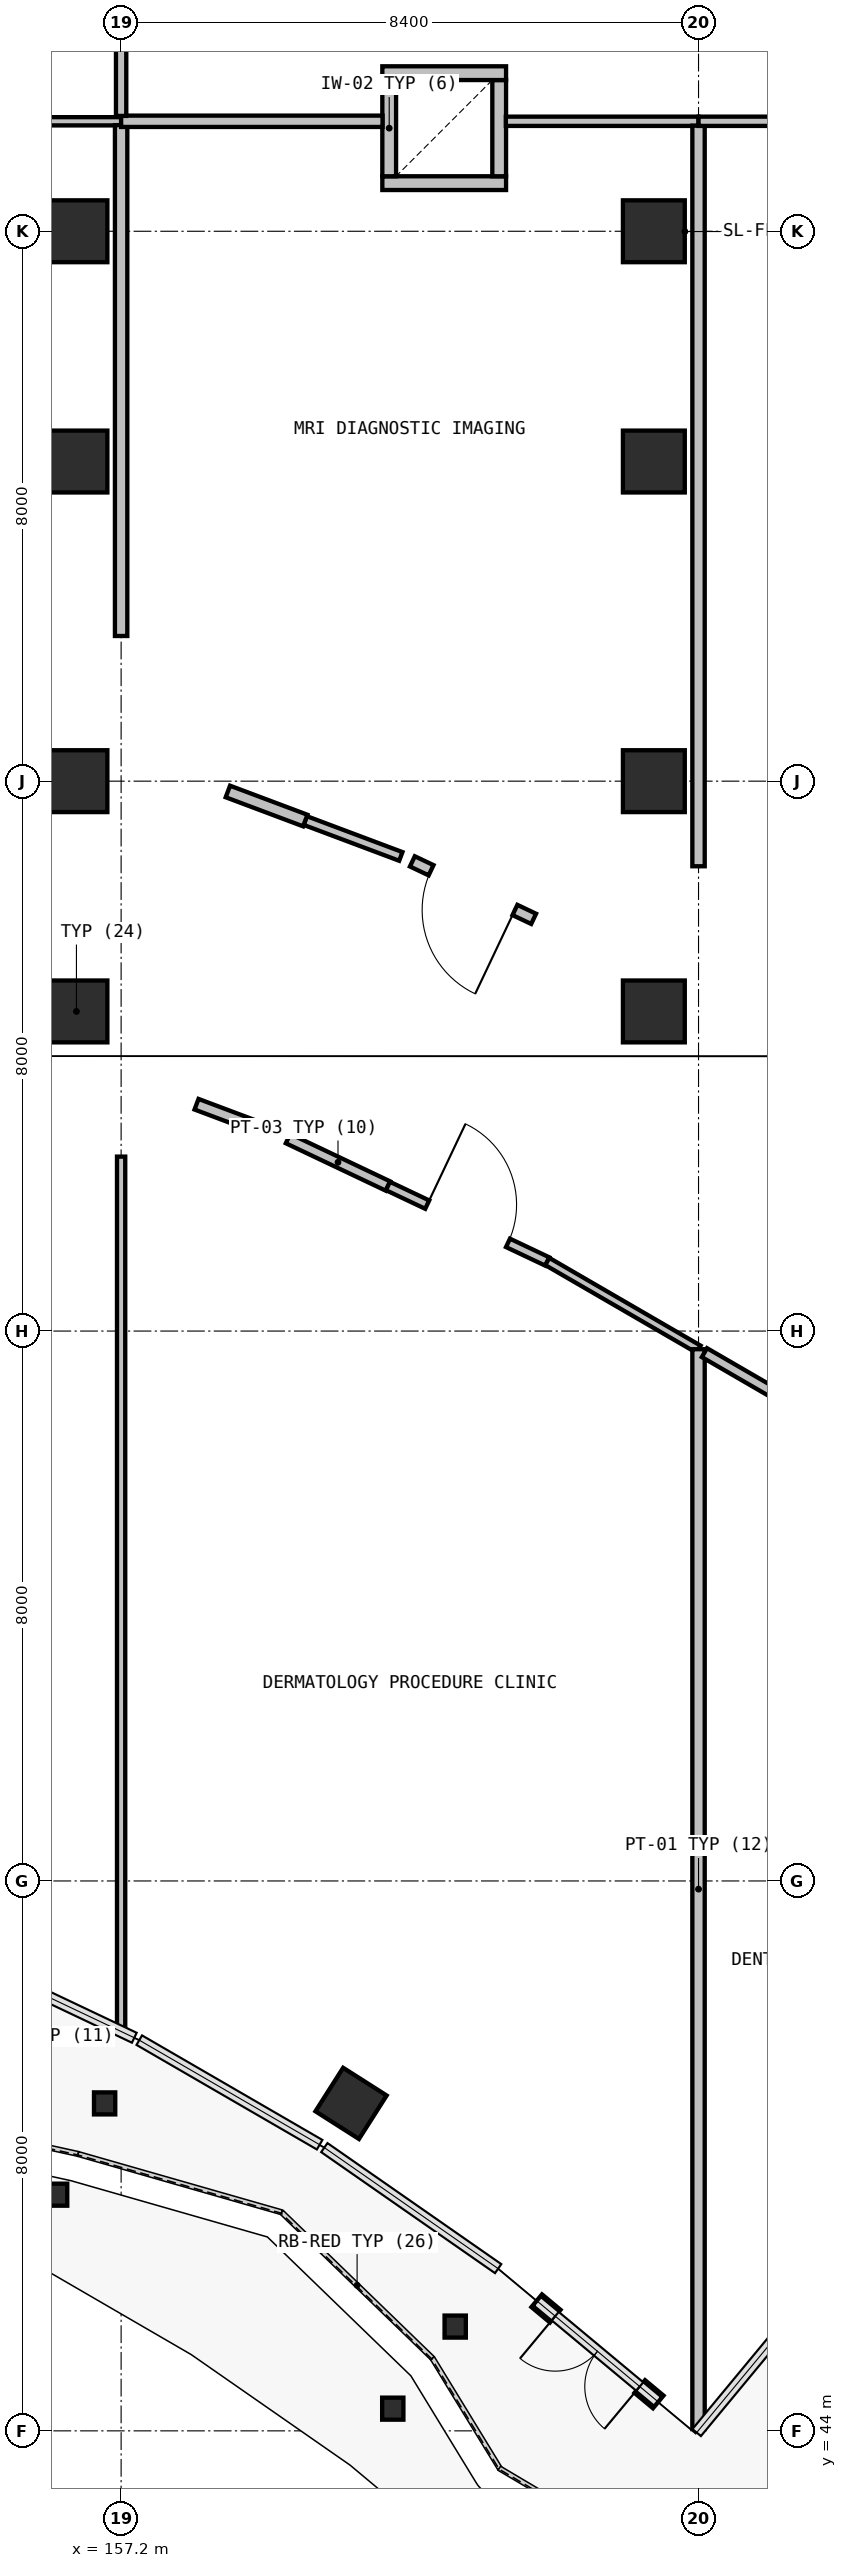
"""IFC4 building model, lengths in metres.
Left out: names, types, materials, properties, quantities, classifications, styles, units other than length and angle.
Written with IfcOpenShell. Run it as: python <this file> out.ifc"""

import sys

from ifc_helpers import new_model, si_unit, direction, frame, frame_2d, origin, origin_2d, place, context, subcontext, project, spatial, rectangle, i_section, extrude, element, fill, save


model = new_model("IFC4")
c1 = context("Model", 3, precision=1e-05, world=origin(), true_north=direction((0.0, 1.0)))
c2 = subcontext(c1, "Body", "Model", "MODEL_VIEW")
j1 = project(units=[si_unit("LENGTHUNIT", "METRE"), si_unit("PLANEANGLEUNIT", "RADIAN")], contexts=[c1])
p1 = place(None, origin())
s1 = spatial("IfcSite", under=j1, at=p1, CompositionType="ELEMENT")
p2 = place(p1, origin())
s2 = spatial("IfcBuilding", under=s1, at=p2, CompositionType="ELEMENT")
p3 = place(p2, origin())
s3 = spatial("IfcBuildingStorey", under=s2, at=p3, CompositionType="ELEMENT", Elevation=0.0)
for number, where, z_axis, x_axis in (
    (1, (156.96, 48.764, 0.0), (0.0, 0.0, 1.0), (1.0, 0.0, 0.0)),
    (2, (156.262, 47.436, 0.0), (0.0, 0.0, 1.0), (1.0, 0.0, 0.0)),
    (3, (162.06, 45.517, 0.0), (0.0, 0.0, 1.0), (1.0, 0.0, 0.0)),
    (4, (161.152, 44.323, 0.0), (0.0, 0.0, 1.0), (1.0, 0.0, 0.0)),
):
    element("IfcColumn", number, at=place(p3, frame(where, z_axis=z_axis, x_axis=x_axis)), inside=s3, PredefinedType="COLUMN", context=c2, shape_type="SweptSolid", body=[
        extrude(i_section(OverallWidth=0.309, OverallDepth=0.321, WebThickness=0.014, FlangeThickness=0.022, at=origin_2d()), origin(), (0.0, 0.0, 1.0), 5.08),
    ])
for number, where, z_axis, x_axis in (
    (5, (156.55, 64.65, 0.0), (0.0, 0.0, 1.0), (1.0, 0.0, 0.0)),
    (6, (156.55, 68.0, 0.0), (0.0, 0.0, 1.0), (1.0, 0.0, 0.0)),
    (7, (156.55, 72.65, 0.0), (0.0, 0.0, 1.0), (1.0, 0.0, 0.0)),
    (8, (156.55, 76.0, 0.0), (0.0, 0.0, 1.0), (1.0, 0.0, 0.0)),
    (9, (164.95, 64.65, 0.0), (0.0, 0.0, 1.0), (1.0, 0.0, 0.0)),
    (10, (164.95, 68.0, 0.0), (0.0, 0.0, 1.0), (1.0, 0.0, 0.0)),
    (11, (164.95, 72.65, 0.0), (0.0, 0.0, 1.0), (1.0, 0.0, 0.0)),
    (12, (164.95, 76.0, 0.0), (0.0, 0.0, 1.0), (1.0, 0.0, 0.0)),
):
    element("IfcColumn", number, at=place(p3, frame(where, z_axis=z_axis, x_axis=x_axis)), inside=s3, PredefinedType="COLUMN", context=c2, shape_type="SweptSolid", body=[
        extrude(rectangle(XDim=0.9, YDim=0.9, at=origin_2d()), origin(), (0.0, 0.0, 1.0), 5.4),
    ])
p4 = place(p3, frame((160.545, 48.764, 0.0), z_axis=(0.0, 0.0, 1.0), x_axis=(0.537064068078, 0.843541455282, 0.0)))
e13 = element("IfcColumn", 13, at=p4, inside=s3, PredefinedType="COLUMN", context=c2, shape_type="SweptSolid", body=[
    extrude(rectangle(XDim=0.75, YDim=0.75, at=origin_2d()), origin(), (0.0, 0.0, 1.0), 5.4),
])
p5 = place(p3, frame((165.014, 44.421, 0.0), z_axis=(0.0, 0.0, 1.0), x_axis=(-0.768438701021, 0.639923403833, 0.0)))
e14 = element("IfcWall", 14, at=p5, inside=s3, PredefinedType="SOLIDWALL", context=c2, shape_type="SweptSolid", body=[
    extrude(rectangle(XDim=2.301, YDim=0.24, at=frame_2d((1.15, 0.0))), origin(), (0.0, 0.0, 1.0), 2.32),
])
p6 = place(p5, frame((0.35, 0.0, 0.0)))
e15 = element("IfcOpeningElement", 15, at=p6, cuts=e14, PredefinedType="OPENING", context=c2, shape_type="SweptSolid", body=[
    extrude(rectangle(XDim=1.6, YDim=2.2, at=frame_2d((0.8, 1.1))), frame((0.0, 0.13, 0.0), z_axis=(0.0, -1.0, 0.0), x_axis=(1.0, 0.0, 0.0)), (0.0, 0.0, 1.0), 0.26),
])
p7 = place(p3, frame((161.0, 76.7, 0.0), z_axis=(0.0, 0.0, 1.0), x_axis=(1.0, 0.0, 0.0)))
e16 = element("IfcWall", 16, at=p7, inside=s3, PredefinedType="SOLIDWALL", context=c2, shape_type="SweptSolid", body=[
    extrude(rectangle(XDim=1.8, YDim=0.2, at=frame_2d((0.9, 0.0))), origin(), (0.0, 0.0, 1.0), 5.08),
])
p8 = place(p3, frame((162.7, 76.8, 0.0), z_axis=(0.0, 0.0, 1.0), x_axis=(0.0, 1.0, 0.0)))
e17 = element("IfcWall", 17, at=p8, inside=s3, PredefinedType="SOLIDWALL", context=c2, shape_type="SweptSolid", body=[
    extrude(rectangle(XDim=1.4, YDim=0.2, at=frame_2d((0.7, 0.0))), origin(), (0.0, 0.0, 1.0), 5.08),
])
p9 = place(p3, frame((162.8, 78.3, 0.0), z_axis=(0.0, 0.0, 1.0), x_axis=(-1.0, 0.0, 0.0)))
e18 = element("IfcWall", 18, at=p9, inside=s3, PredefinedType="SOLIDWALL", context=c2, shape_type="SweptSolid", body=[
    extrude(rectangle(XDim=1.8, YDim=0.2, at=frame_2d((0.9, 0.0))), origin(), (0.0, 0.0, 1.0), 5.08),
])
p10 = place(p3, frame((161.1, 78.2, 0.0), z_axis=(0.0, 0.0, 1.0), x_axis=(0.0, -1.0, 0.0)))
e19 = element("IfcWall", 19, at=p10, inside=s3, PredefinedType="SOLIDWALL", context=c2, shape_type="SweptSolid", body=[
    extrude(rectangle(XDim=1.4, YDim=0.2, at=frame_2d((0.7, 0.0))), origin(), (0.0, 0.0, 1.0), 5.08),
])
p11 = place(p3, frame((157.2, 62.538, 0.0), z_axis=(0.0, 0.0, 1.0), x_axis=(0.0, -1.0, 0.0)))
e20 = element("IfcWall", 20, at=p11, inside=s3, PredefinedType="PARTITIONING", context=c2, shape_type="SweptSolid", body=[
    extrude(rectangle(XDim=12.715, YDim=0.12, at=frame_2d((6.357, 0.0))), origin(), (0.0, 0.0, 1.0), 5.08),
])
p12 = place(p3, frame((140.4, 77.6, 0.0), z_axis=(0.0, 0.0, 1.0), x_axis=(1.0, 0.0, 0.0)))
e21 = element("IfcWall", 21, at=p12, inside=s3, PredefinedType="PARTITIONING", context=c2, shape_type="SweptSolid", body=[
    extrude(rectangle(XDim=16.8, YDim=0.12, at=frame_2d((8.4, 0.0))), origin(), (0.0, 0.0, 1.0), 5.08),
])
p13 = place(p3, frame((157.2, 77.544, 0.0), z_axis=(0.0, 0.0, 1.0), x_axis=(0.0, -1.0, 0.0)))
e22 = element("IfcWall", 22, at=p13, inside=s3, PredefinedType="PARTITIONING", context=c2, shape_type="SweptSolid", body=[
    extrude(rectangle(XDim=7.432, YDim=0.18, at=frame_2d((3.716, 0.0))), origin(), (0.0, 0.0, 1.0), 5.08),
])
p14 = place(p3, frame((158.297, 63.3, 0.0), z_axis=(0.0, 0.0, 1.0), x_axis=(0.936068241983, -0.351818484947, 0.0)))
e23 = element("IfcWall", 23, at=p14, inside=s3, PredefinedType="PARTITIONING", context=c2, shape_type="SweptSolid", body=[
    extrude(rectangle(XDim=1.078, YDim=0.165, at=frame_2d((0.539, 0.0))), origin(), (0.0, 0.0, 1.0), 5.08),
])
p15 = place(p3, frame((159.628, 62.8, 0.0), z_axis=(0.0, 0.0, 1.0), x_axis=(0.903459666256, -0.428673105581, 0.0)))
e24 = element("IfcWall", 24, at=p15, inside=s3, PredefinedType="PARTITIONING", context=c2, shape_type="SweptSolid", body=[
    extrude(rectangle(XDim=1.609, YDim=0.15, at=frame_2d((0.805, 0.0))), origin(), (0.0, 0.0, 1.0), 5.08),
])
p16 = place(p3, frame((161.082, 62.11, 0.0), z_axis=(0.0, 0.0, 1.0), x_axis=(0.903706825323, -0.428151811703, 0.0)))
e25 = element("IfcWall", 25, at=p16, inside=s3, PredefinedType="PARTITIONING", context=c2, shape_type="SweptSolid", body=[
    extrude(rectangle(XDim=2.565, YDim=0.135, at=frame_2d((1.282, 0.0))), origin(), (0.0, 0.0, 1.0), 5.08),
])
p17 = place(p16, frame((0.632, 0.0, 0.0)))
e26 = element("IfcOpeningElement", 26, at=p17, cuts=e25, PredefinedType="OPENING", context=c2, shape_type="SweptSolid", body=[
    extrude(rectangle(XDim=1.3, YDim=2.15, at=frame_2d((0.65, 1.075))), frame((0.0, 0.077, 0.0), z_axis=(0.0, -1.0, 0.0), x_axis=(1.0, 0.0, 0.0)), (0.0, 0.0, 1.0), 0.155),
])
p18 = place(p3, frame((163.4, 61.012, 0.0), z_axis=(0.0, 0.0, 1.0), x_axis=(0.865071180383, -0.501649133231, 0.0)))
e27 = element("IfcWall", 27, at=p18, inside=s3, PredefinedType="PARTITIONING", context=c2, shape_type="SweptSolid", body=[
    extrude(rectangle(XDim=2.543, YDim=0.12, at=frame_2d((1.272, 0.0))), origin(), (0.0, 0.0, 1.0), 5.08),
])
p19 = place(p3, frame((165.6, 59.736, 0.0), z_axis=(0.0, 0.0, 1.0), x_axis=(0.0, -1.0, 0.0)))
e28 = element("IfcWall", 28, at=p19, inside=s3, PredefinedType="PARTITIONING", context=c2, shape_type="SweptSolid", body=[
    extrude(rectangle(XDim=15.71, YDim=0.18, at=frame_2d((7.855, 0.0))), origin(), (0.0, 0.0, 1.0), 5.08),
])
p20 = place(p3, frame((163.201, 65.997, 0.0), z_axis=(0.0, 0.0, 1.0), x_axis=(-0.903658874167, 0.428253008325, 0.0)))
e29 = element("IfcWall", 29, at=p20, inside=s3, PredefinedType="PARTITIONING", context=c2, shape_type="SweptSolid", body=[
    extrude(rectangle(XDim=1.952, YDim=0.165, at=frame_2d((0.976, 0.0))), origin(), (0.0, 0.0, 1.0), 5.08),
])
p21 = place(p20, frame((0.301, 0.0, 0.0)))
e30 = element("IfcOpeningElement", 30, at=p21, cuts=e29, PredefinedType="OPENING", context=c2, shape_type="SweptSolid", body=[
    extrude(rectangle(XDim=1.35, YDim=2.15, at=frame_2d((0.675, 1.075))), frame((0.0, 0.093, 0.0), z_axis=(0.0, -1.0, 0.0), x_axis=(1.0, 0.0, 0.0)), (0.0, 0.0, 1.0), 0.185),
])
p22 = place(p3, frame((161.269, 66.905, 0.0), z_axis=(0.0, 0.0, 1.0), x_axis=(-0.936180444255, 0.351519808538, 0.0)))
e31 = element("IfcWall", 31, at=p22, inside=s3, PredefinedType="PARTITIONING", context=c2, shape_type="SweptSolid", body=[
    extrude(rectangle(XDim=1.485, YDim=0.135, at=frame_2d((0.742, 0.0))), origin(), (0.0, 0.0, 1.0), 5.08),
])
p23 = place(p3, frame((159.879, 67.427, 0.0), z_axis=(0.0, 0.0, 1.0), x_axis=(-0.936095416468, 0.351746174488, 0.0)))
e32 = element("IfcWall", 32, at=p23, inside=s3, PredefinedType="PARTITIONING", context=c2, shape_type="SweptSolid", body=[
    extrude(rectangle(XDim=1.203, YDim=0.18, at=frame_2d((0.602, 0.0))), origin(), (0.0, 0.0, 1.0), 4.23),
])
p24 = place(p3, frame((157.2, 77.6, 0.0), z_axis=(0.0, 0.0, 1.0), x_axis=(1.0, 0.0, 0.0)))
e33 = element("IfcWall", 33, at=p24, inside=s3, PredefinedType="PARTITIONING", context=c2, shape_type="SweptSolid", body=[
    extrude(rectangle(XDim=3.803, YDim=0.165, at=frame_2d((1.901, 0.0))), origin(), (0.0, 0.0, 1.0), 5.08),
])
p25 = place(p3, frame((162.797, 77.6, 0.0), z_axis=(0.0, 0.0, 1.0), x_axis=(1.0, 0.0, 0.0)))
e34 = element("IfcWall", 34, at=p25, inside=s3, PredefinedType="PARTITIONING", context=c2, shape_type="SweptSolid", body=[
    extrude(rectangle(XDim=2.803, YDim=0.135, at=frame_2d((1.401, 0.0))), origin(), (0.0, 0.0, 1.0), 5.08),
])
p26 = place(p3, frame((165.6, 77.536, 0.0), z_axis=(0.0, 0.0, 1.0), x_axis=(0.0, -1.0, 0.0)))
e35 = element("IfcWall", 35, at=p26, inside=s3, PredefinedType="PARTITIONING", context=c2, shape_type="SweptSolid", body=[
    extrude(rectangle(XDim=10.774, YDim=0.18, at=frame_2d((5.387, 0.0))), origin(), (0.0, 0.0, 1.0), 5.08),
])
p27 = place(p3, frame((165.686, 59.686, 0.0), z_axis=(0.0, 0.0, 1.0), x_axis=(0.864985497408, -0.501796860565, 0.0)))
e36 = element("IfcWall", 36, at=p27, inside=s3, PredefinedType="PARTITIONING", context=c2, shape_type="SweptSolid", body=[
    extrude(rectangle(XDim=1.531, YDim=0.15, at=frame_2d((0.765, 0.0))), origin(), (0.0, 0.0, 1.0), 5.08),
])
p28 = place(p3, frame((165.6, 77.6, 0.0), z_axis=(0.0, 0.0, 1.0), x_axis=(1.0, 0.0, 0.0)))
e37 = element("IfcWall", 37, at=p28, inside=s3, PredefinedType="PARTITIONING", context=c2, shape_type="SweptSolid", body=[
    extrude(rectangle(XDim=8.4, YDim=0.135, at=frame_2d((4.2, 0.0))), origin(), (0.0, 0.0, 1.0), 5.08),
])
p29 = place(p3, frame((157.2, 79.504, 0.0), z_axis=(0.0, 0.0, 1.0), x_axis=(0.0, -1.0, 0.0)))
e38 = element("IfcWall", 38, at=p29, inside=s3, PredefinedType="PARTITIONING", context=c2, shape_type="SweptSolid", body=[
    extrude(rectangle(XDim=1.826, YDim=0.15, at=frame_2d((0.913, 0.0))), origin(), (0.0, 0.0, 1.0), 5.08),
])
p30 = place(p6, origin())
e39 = element("IfcDoor", 39, at=p30, inside=s3, OperationType="DOUBLE_DOOR_SINGLE_SWING", PredefinedType="DOOR", context=c2, shape_type="SweptSolid", body=[
    extrude(rectangle(XDim=1.6, YDim=2.2, at=frame_2d((0.8, 1.1))), frame((0.0, 0.025, 0.0), z_axis=(0.0, -1.0, 0.0), x_axis=(1.0, 0.0, 0.0)), (0.0, 0.0, 1.0), 0.05),
])
fill(e15, e39)
p31 = place(p17, origin())
e40 = element("IfcDoor", 40, at=p31, inside=s3, OperationType="SINGLE_SWING_RIGHT", PredefinedType="DOOR", context=c2, shape_type="SweptSolid", body=[
    extrude(rectangle(XDim=1.3, YDim=2.15, at=frame_2d((0.65, 1.075))), frame((0.0, 0.025, 0.0), z_axis=(0.0, -1.0, 0.0), x_axis=(1.0, 0.0, 0.0)), (0.0, 0.0, 1.0), 0.05),
])
fill(e26, e40)
p32 = place(p21, origin())
e41 = element("IfcDoor", 41, at=p32, inside=s3, OperationType="SINGLE_SWING_LEFT", PredefinedType="DOOR", context=c2, shape_type="SweptSolid", body=[
    extrude(rectangle(XDim=1.35, YDim=2.15, at=frame_2d((0.675, 1.075))), frame((0.0, 0.025, 0.0), z_axis=(0.0, -1.0, 0.0), x_axis=(1.0, 0.0, 0.0)), (0.0, 0.0, 1.0), 0.05),
])
fill(e30, e41)
save(model, sys.argv[1])
